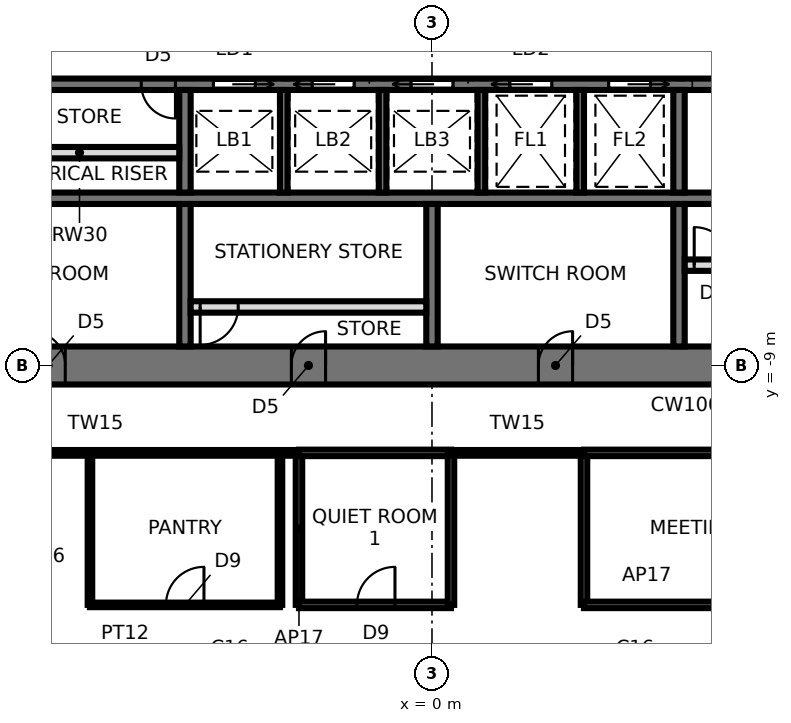
"""IFC4 building model, lengths in metres.
Left out: names, types, materials, properties, quantities, classifications, styles, units other than length and angle.
Written with IfcOpenShell. Run it as: python <this file> out.ifc"""

import sys

from ifc_helpers import new_model, si_unit, direction, frame, frame_2d, origin, place, context, subcontext, project, spatial, rectangle, extrude, element, fill, save


model = new_model("IFC4")
c1 = context("Model", 3, precision=1e-05, world=origin(), true_north=direction((0.0, 1.0)))
c2 = subcontext(c1, "Body", "Model", "MODEL_VIEW")
j1 = project(units=[si_unit("LENGTHUNIT", "METRE"), si_unit("PLANEANGLEUNIT", "RADIAN")], contexts=[c1])
p1 = place(None, origin())
s1 = spatial("IfcSite", under=j1, at=p1, CompositionType="ELEMENT")
p2 = place(p1, origin())
s2 = spatial("IfcBuilding", under=s1, at=p2, CompositionType="ELEMENT")
p3 = place(p2, frame((0.0, 0.0, 127.5)))
s3 = spatial("IfcBuildingStorey", under=s2, at=p3, CompositionType="ELEMENT", Elevation=127.5)
p4 = place(p3, frame((-13.2, -9.0, 0.0), z_axis=(0.0, 0.0, 1.0), x_axis=(1.0, 0.0, 0.0)))
e1 = element("IfcWall", 1, at=p4, inside=s3, PredefinedType="SHEAR", context=c2, shape_type="SweptSolid", body=[
    extrude(rectangle(XDim=26.4, YDim=1.0, at=frame_2d((13.2, 0.0))), origin(), (0.0, 0.0, 1.0), 3.9),
])
p5 = place(p4, frame((2.65, 0.0, 0.0)))
e2 = element("IfcOpeningElement", 2, at=p5, cuts=e1, PredefinedType="OPENING", context=c2, shape_type="SweptSolid", body=[
    extrude(rectangle(XDim=0.9, YDim=2.1, at=frame_2d((0.45, 1.05))), frame((0.0, 0.51, 0.0), z_axis=(0.0, -1.0, 0.0), x_axis=(1.0, 0.0, 0.0)), (0.0, 0.0, 1.0), 1.02),
])
p6 = place(p4, frame((9.5, 0.0, 0.0)))
e3 = element("IfcOpeningElement", 3, at=p6, cuts=e1, PredefinedType="OPENING", context=c2, shape_type="SweptSolid", body=[
    extrude(rectangle(XDim=0.9, YDim=2.1, at=frame_2d((0.45, 1.05))), frame((0.0, 0.51, 0.0), z_axis=(0.0, -1.0, 0.0), x_axis=(1.0, 0.0, 0.0)), (0.0, 0.0, 1.0), 1.02),
])
p7 = place(p4, frame((16.0, 0.0, 0.0)))
e4 = element("IfcOpeningElement", 4, at=p7, cuts=e1, PredefinedType="OPENING", context=c2, shape_type="SweptSolid", body=[
    extrude(rectangle(XDim=0.9, YDim=2.1, at=frame_2d((0.45, 1.05))), frame((0.0, 0.51, 0.0), z_axis=(0.0, -1.0, 0.0), x_axis=(1.0, 0.0, 0.0)), (0.0, 0.0, 1.0), 1.02),
])
p8 = place(p4, frame((22.85, 0.0, 0.0)))
e5 = element("IfcOpeningElement", 5, at=p8, cuts=e1, PredefinedType="OPENING", context=c2, shape_type="SweptSolid", body=[
    extrude(rectangle(XDim=0.9, YDim=2.1, at=frame_2d((0.45, 1.05))), frame((0.0, 0.51, 0.0), z_axis=(0.0, -1.0, 0.0), x_axis=(1.0, 0.0, 0.0)), (0.0, 0.0, 1.0), 1.02),
])
p9 = place(p3, frame((-13.2, -1.6, 0.0), z_axis=(0.0, 0.0, 1.0), x_axis=(1.0, 0.0, 0.0)))
e6 = element("IfcWall", 6, at=p9, inside=s3, PredefinedType="SHEAR", context=c2, shape_type="SweptSolid", body=[
    extrude(rectangle(XDim=26.4, YDim=0.3, at=frame_2d((13.2, 0.0))), origin(), (0.0, 0.0, 1.0), 3.9),
])
p10 = place(p9, frame((25.15, 0.0, 0.0)))
e7 = element("IfcOpeningElement", 7, at=p10, cuts=e6, PredefinedType="OPENING", context=c2, shape_type="SweptSolid", body=[
    extrude(rectangle(XDim=1.0, YDim=2.1, at=frame_2d((0.5, 1.05))), frame((0.0, 0.16, 0.0), z_axis=(0.0, -1.0, 0.0), x_axis=(1.0, 0.0, 0.0)), (0.0, 0.0, 1.0), 0.32),
])
p11 = place(p9, frame((7.45, 0.0, 0.0)))
e8 = element("IfcOpeningElement", 8, at=p11, cuts=e6, PredefinedType="OPENING", context=c2, shape_type="SweptSolid", body=[
    extrude(rectangle(XDim=1.1, YDim=2.3, at=frame_2d((0.55, 1.15))), frame((0.0, 0.16, 0.0), z_axis=(0.0, -1.0, 0.0), x_axis=(1.0, 0.0, 0.0)), (0.0, 0.0, 1.0), 0.32),
])
p12 = place(p9, frame((10.05, 0.0, 0.0)))
e9 = element("IfcOpeningElement", 9, at=p12, cuts=e6, PredefinedType="OPENING", context=c2, shape_type="SweptSolid", body=[
    extrude(rectangle(XDim=1.1, YDim=2.3, at=frame_2d((0.55, 1.15))), frame((0.0, 0.16, 0.0), z_axis=(0.0, -1.0, 0.0), x_axis=(1.0, 0.0, 0.0)), (0.0, 0.0, 1.0), 0.32),
])
p13 = place(p9, frame((12.65, 0.0, 0.0)))
e10 = element("IfcOpeningElement", 10, at=p13, cuts=e6, PredefinedType="OPENING", context=c2, shape_type="SweptSolid", body=[
    extrude(rectangle(XDim=1.1, YDim=2.3, at=frame_2d((0.55, 1.15))), frame((0.0, 0.16, 0.0), z_axis=(0.0, -1.0, 0.0), x_axis=(1.0, 0.0, 0.0)), (0.0, 0.0, 1.0), 0.32),
])
p14 = place(p9, frame((15.25, 0.0, 0.0)))
e11 = element("IfcOpeningElement", 11, at=p14, cuts=e6, PredefinedType="OPENING", context=c2, shape_type="SweptSolid", body=[
    extrude(rectangle(XDim=1.1, YDim=2.3, at=frame_2d((0.55, 1.15))), frame((0.0, 0.16, 0.0), z_axis=(0.0, -1.0, 0.0), x_axis=(1.0, 0.0, 0.0)), (0.0, 0.0, 1.0), 0.32),
])
p15 = place(p9, frame((17.85, 0.0, 0.0)))
e12 = element("IfcOpeningElement", 12, at=p15, cuts=e6, PredefinedType="OPENING", context=c2, shape_type="SweptSolid", body=[
    extrude(rectangle(XDim=1.1, YDim=2.3, at=frame_2d((0.55, 1.15))), frame((0.0, 0.16, 0.0), z_axis=(0.0, -1.0, 0.0), x_axis=(1.0, 0.0, 0.0)), (0.0, 0.0, 1.0), 0.32),
])
p16 = place(p9, frame((5.55, 0.0, 0.0)))
e13 = element("IfcOpeningElement", 13, at=p16, cuts=e6, PredefinedType="OPENING", context=c2, shape_type="SweptSolid", body=[
    extrude(rectangle(XDim=0.9, YDim=2.1, at=frame_2d((0.45, 1.05))), frame((0.0, 0.16, 0.0), z_axis=(0.0, -1.0, 0.0), x_axis=(1.0, 0.0, 0.0)), (0.0, 0.0, 1.0), 0.32),
])
p17 = place(p3, frame((-13.2, -4.6, 0.0), z_axis=(0.0, 0.0, 1.0), x_axis=(1.0, 0.0, 0.0)))
e14 = element("IfcWall", 14, at=p17, inside=s3, PredefinedType="SHEAR", context=c2, shape_type="SweptSolid", body=[
    extrude(rectangle(XDim=26.4, YDim=0.3, at=frame_2d((13.2, 0.0))), origin(), (0.0, 0.0, 1.0), 3.9),
])
p18 = place(p3, frame((-6.5, -1.75, 0.0), z_axis=(0.0, 0.0, 1.0), x_axis=(0.0, -1.0, 0.0)))
e15 = element("IfcWall", 15, at=p18, inside=s3, PredefinedType="SHEAR", context=c2, shape_type="SweptSolid", body=[
    extrude(rectangle(XDim=2.7, YDim=0.3, at=frame_2d((1.35, 0.0))), origin(), (0.0, 0.0, 1.0), 3.9),
])
p19 = place(p3, frame((-6.5, -4.75, 0.0), z_axis=(0.0, 0.0, 1.0), x_axis=(0.0, -1.0, 0.0)))
e16 = element("IfcWall", 16, at=p19, inside=s3, PredefinedType="SHEAR", context=c2, shape_type="SweptSolid", body=[
    extrude(rectangle(XDim=3.75, YDim=0.3, at=frame_2d((1.875, 0.0))), origin(), (0.0, 0.0, 1.0), 3.9),
])
p20 = place(p3, frame((6.5, -1.75, 0.0), z_axis=(0.0, 0.0, 1.0), x_axis=(0.0, -1.0, 0.0)))
e17 = element("IfcWall", 17, at=p20, inside=s3, PredefinedType="SHEAR", context=c2, shape_type="SweptSolid", body=[
    extrude(rectangle(XDim=2.7, YDim=0.3, at=frame_2d((1.35, 0.0))), origin(), (0.0, 0.0, 1.0), 3.9),
])
p21 = place(p3, frame((6.5, -4.75, 0.0), z_axis=(0.0, 0.0, 1.0), x_axis=(0.0, -1.0, 0.0)))
e18 = element("IfcWall", 18, at=p21, inside=s3, PredefinedType="SHEAR", context=c2, shape_type="SweptSolid", body=[
    extrude(rectangle(XDim=3.75, YDim=0.3, at=frame_2d((1.875, 0.0))), origin(), (0.0, 0.0, 1.0), 3.9),
])
for number, where, z_axis, x_axis in (
    (19, (-3.9, -1.75, 0.0), (0.0, 0.0, 1.0), (0.0, -1.0, 0.0)),
    (20, (-1.3, -1.75, 0.0), (0.0, 0.0, 1.0), (0.0, -1.0, 0.0)),
    (21, (1.3, -1.75, 0.0), (0.0, 0.0, 1.0), (0.0, -1.0, 0.0)),
    (22, (3.9, -1.75, 0.0), (0.0, 0.0, 1.0), (0.0, -1.0, 0.0)),
):
    element("IfcWall", number, at=place(p3, frame(where, z_axis=z_axis, x_axis=x_axis)), inside=s3, PredefinedType="SHEAR", context=c2, shape_type="SweptSolid", body=[
        extrude(rectangle(XDim=2.7, YDim=0.2, at=frame_2d((1.35, 0.0))), origin(), (0.0, 0.0, 1.0), 3.9),
    ])
p22 = place(p3, frame((0.0, -4.75, 0.0), z_axis=(0.0, 0.0, 1.0), x_axis=(0.0, -1.0, 0.0)))
e23 = element("IfcWall", 23, at=p22, inside=s3, PredefinedType="SHEAR", context=c2, shape_type="SweptSolid", body=[
    extrude(rectangle(XDim=3.75, YDim=0.3, at=frame_2d((1.875, 0.0))), origin(), (0.0, 0.0, 1.0), 3.9),
])
p23 = place(p3, frame((-6.35, -7.46, 0.0), z_axis=(0.0, 0.0, 1.0), x_axis=(1.0, 0.0, 0.0)))
e24 = element("IfcWall", 24, at=p23, inside=s3, PredefinedType="PARTITIONING", context=c2, shape_type="SweptSolid", body=[
    extrude(rectangle(XDim=6.2, YDim=0.3, at=frame_2d((3.1, 0.0))), origin(), (0.0, 0.0, 1.0), 3.74),
])
p24 = place(p23, frame((0.25, 0.0, 0.0)))
e25 = element("IfcOpeningElement", 25, at=p24, cuts=e24, PredefinedType="OPENING", context=c2, shape_type="SweptSolid", body=[
    extrude(rectangle(XDim=1.0, YDim=2.4, at=frame_2d((0.5, 1.2))), frame((0.0, 0.16, 0.0), z_axis=(0.0, -1.0, 0.0), x_axis=(1.0, 0.0, 0.0)), (0.0, 0.0, 1.0), 0.32),
])
p25 = place(p3, frame((6.65, -6.36, 0.0), z_axis=(0.0, 0.0, 1.0), x_axis=(1.0, 0.0, 0.0)))
e26 = element("IfcWall", 26, at=p25, inside=s3, PredefinedType="PARTITIONING", context=c2, shape_type="SweptSolid", body=[
    extrude(rectangle(XDim=6.55, YDim=0.3, at=frame_2d((3.275, 0.0))), origin(), (0.0, 0.0, 1.0), 3.74),
])
p26 = place(p25, frame((0.25, 0.0, 0.0)))
e27 = element("IfcOpeningElement", 27, at=p26, cuts=e26, PredefinedType="OPENING", context=c2, shape_type="SweptSolid", body=[
    extrude(rectangle(XDim=1.0, YDim=2.4, at=frame_2d((0.5, 1.2))), frame((0.0, 0.16, 0.0), z_axis=(0.0, -1.0, 0.0), x_axis=(1.0, 0.0, 0.0)), (0.0, 0.0, 1.0), 0.32),
])
p27 = place(p3, frame((-13.2, -3.4, 0.0), z_axis=(0.0, 0.0, 1.0), x_axis=(1.0, 0.0, 0.0)))
e28 = element("IfcWall", 28, at=p27, inside=s3, PredefinedType="SOLIDWALL", context=c2, shape_type="SweptSolid", body=[
    extrude(rectangle(XDim=6.55, YDim=0.3, at=frame_2d((3.275, 0.0))), origin(), (0.0, 0.0, 1.0), 3.74),
])
p28 = place(p27, frame((0.25, 0.0, 0.0)))
e29 = element("IfcOpeningElement", 29, at=p28, cuts=e28, PredefinedType="OPENING", context=c2, shape_type="SweptSolid", body=[
    extrude(rectangle(XDim=0.9, YDim=2.1, at=frame_2d((0.45, 1.05))), frame((0.0, 0.16, 0.0), z_axis=(0.0, -1.0, 0.0), x_axis=(1.0, 0.0, 0.0)), (0.0, 0.0, 1.0), 0.32),
])
p29 = place(p3, frame((-14.2, -11.3, 0.0), z_axis=(0.0, 0.0, 1.0), x_axis=(1.0, 0.0, 0.0)))
e30 = element("IfcWall", 30, at=p29, inside=s3, PredefinedType="PARTITIONING", context=c2, shape_type="SweptSolid", body=[
    extrude(rectangle(XDim=10.7, YDim=0.15, at=frame_2d((5.35, 0.0))), origin(), (0.0, 0.0, 1.0), 3.74),
])
p30 = place(p3, frame((-9.0, -11.3, 0.0), z_axis=(0.0, 0.0, 1.0), x_axis=(0.0, -1.0, 0.0)))
e31 = element("IfcWall", 31, at=p30, inside=s3, PredefinedType="PARTITIONING", context=c2, shape_type="SweptSolid", body=[
    extrude(rectangle(XDim=4.0, YDim=0.12, at=frame_2d((2.0, 0.0))), origin(), (0.0, 0.0, 1.0), 3.74),
])
p31 = place(p3, frame((-9.0, -15.3, 0.0), z_axis=(0.0, 0.0, 1.0), x_axis=(1.0, 0.0, 0.0)))
e32 = element("IfcWall", 32, at=p31, inside=s3, PredefinedType="PARTITIONING", context=c2, shape_type="SweptSolid", body=[
    extrude(rectangle(XDim=5.0, YDim=0.12, at=frame_2d((2.5, 0.0))), origin(), (0.0, 0.0, 1.0), 3.286),
])
p32 = place(p31, frame((2.0, 0.0, 0.0)))
e33 = element("IfcOpeningElement", 33, at=p32, cuts=e32, PredefinedType="OPENING", context=c2, shape_type="SweptSolid", body=[
    extrude(rectangle(XDim=1.0, YDim=2.4, at=frame_2d((0.5, 1.2))), frame((0.0, 0.07, 0.0), z_axis=(0.0, -1.0, 0.0), x_axis=(1.0, 0.0, 0.0)), (0.0, 0.0, 1.0), 0.14),
])
p33 = place(p3, frame((-4.0, -15.3, 0.0), z_axis=(0.0, 0.0, 1.0), x_axis=(0.0, 1.0, 0.0)))
e34 = element("IfcWall", 34, at=p33, inside=s3, PredefinedType="PARTITIONING", context=c2, shape_type="SweptSolid", body=[
    extrude(rectangle(XDim=4.0, YDim=0.12, at=frame_2d((2.0, 0.0))), origin(), (0.0, 0.0, 1.0), 3.74),
])
for number, where, z_axis, x_axis in (
    (35, (-3.5, -11.3, 0.0), (0.0, 0.0, 1.0), (0.0, -1.0, 0.0)),
    (36, (0.5, -11.3, 0.0), (0.0, 0.0, 1.0), (-1.0, 0.0, 0.0)),
):
    element("IfcWall", number, at=place(p3, frame(where, z_axis=z_axis, x_axis=x_axis)), inside=s3, PredefinedType="PARTITIONING", context=c2, shape_type="SweptSolid", body=[
        extrude(rectangle(XDim=4.0, YDim=0.17, at=frame_2d((2.0, 0.0))), origin(), (0.0, 0.0, 1.0), 3.74),
    ])
p34 = place(p3, frame((-3.5, -15.3, 0.0), z_axis=(0.0, 0.0, 1.0), x_axis=(1.0, 0.0, 0.0)))
e37 = element("IfcWall", 37, at=p34, inside=s3, PredefinedType="PARTITIONING", context=c2, shape_type="SweptSolid", body=[
    extrude(rectangle(XDim=4.0, YDim=0.17, at=frame_2d((2.0, 0.0))), origin(), (0.0, 0.0, 1.0), 3.74),
])
p35 = place(p34, frame((1.526, 0.0, 0.0)))
e38 = element("IfcOpeningElement", 38, at=p35, cuts=e37, PredefinedType="OPENING", context=c2, shape_type="SweptSolid", body=[
    extrude(rectangle(XDim=1.0, YDim=2.4, at=frame_2d((0.5, 1.2))), frame((0.0, 0.095, 0.0), z_axis=(0.0, -1.0, 0.0), x_axis=(1.0, 0.0, 0.0)), (0.0, 0.0, 1.0), 0.19),
])
p36 = place(p3, frame((0.5, -15.3, 0.0), z_axis=(0.0, 0.0, 1.0), x_axis=(0.0, 1.0, 0.0)))
e39 = element("IfcWall", 39, at=p36, inside=s3, PredefinedType="PARTITIONING", context=c2, shape_type="SweptSolid", body=[
    extrude(rectangle(XDim=4.0, YDim=0.17, at=frame_2d((2.0, 0.0))), origin(), (0.0, 0.0, 1.0), 3.74),
])
p37 = place(p3, frame((0.5, -11.3, 0.0), z_axis=(0.0, 0.0, 1.0), x_axis=(1.0, 0.0, 0.0)))
e40 = element("IfcWall", 40, at=p37, inside=s3, PredefinedType="PARTITIONING", context=c2, shape_type="SweptSolid", body=[
    extrude(rectangle(XDim=3.5, YDim=0.15, at=frame_2d((1.75, 0.0))), origin(), (0.0, 0.0, 1.0), 3.74),
])
p38 = place(p3, frame((4.0, -11.3, 0.0), z_axis=(0.0, 0.0, 1.0), x_axis=(0.0, -1.0, 0.0)))
e41 = element("IfcWall", 41, at=p38, inside=s3, PredefinedType="PARTITIONING", context=c2, shape_type="SweptSolid", body=[
    extrude(rectangle(XDim=4.0, YDim=0.17, at=frame_2d((2.0, 0.0))), origin(), (0.0, 0.0, 1.0), 3.74),
])
p39 = place(p3, frame((4.0, -15.3, 0.0), z_axis=(0.0, 0.0, 1.0), x_axis=(1.0, 0.0, 0.0)))
e42 = element("IfcWall", 42, at=p39, inside=s3, PredefinedType="PARTITIONING", context=c2, shape_type="SweptSolid", body=[
    extrude(rectangle(XDim=8.0, YDim=0.17, at=frame_2d((4.0, 0.0))), origin(), (0.0, 0.0, 1.0), 3.286),
])
p40 = place(p39, frame((3.45, 0.0, 0.0)))
e43 = element("IfcOpeningElement", 43, at=p40, cuts=e42, PredefinedType="OPENING", context=c2, shape_type="SweptSolid", body=[
    extrude(rectangle(XDim=1.1, YDim=2.4, at=frame_2d((0.55, 1.2))), frame((0.0, 0.095, 0.0), z_axis=(0.0, -1.0, 0.0), x_axis=(1.0, 0.0, 0.0)), (0.0, 0.0, 1.0), 0.19),
])
p41 = place(p3, frame((12.0, -11.3, 0.0), z_axis=(0.0, 0.0, 1.0), x_axis=(-1.0, 0.0, 0.0)))
e44 = element("IfcWall", 44, at=p41, inside=s3, PredefinedType="PARTITIONING", context=c2, shape_type="SweptSolid", body=[
    extrude(rectangle(XDim=8.0, YDim=0.17, at=frame_2d((4.0, 0.0))), origin(), (0.0, 0.0, 1.0), 3.74),
])
p42 = place(p11, frame((1.1, 0.0, 0.0), z_axis=(0.0, 0.0, 1.0), x_axis=(-1.0, 0.0, 0.0)))
e45 = element("IfcDoor", 45, at=p42, inside=s3, OperationType="SLIDING_TO_LEFT", PredefinedType="DOOR", context=c2, shape_type="SweptSolid", body=[
    extrude(rectangle(XDim=1.1, YDim=2.3, at=frame_2d((0.55, 1.15))), frame((0.0, 0.025, 0.0), z_axis=(0.0, -1.0, 0.0), x_axis=(1.0, 0.0, 0.0)), (0.0, 0.0, 1.0), 0.05),
])
fill(e8, e45)
p43 = place(p12, frame((1.1, 0.0, 0.0), z_axis=(0.0, 0.0, 1.0), x_axis=(-1.0, 0.0, 0.0)))
e46 = element("IfcDoor", 46, at=p43, inside=s3, OperationType="SLIDING_TO_RIGHT", PredefinedType="DOOR", context=c2, shape_type="SweptSolid", body=[
    extrude(rectangle(XDim=1.1, YDim=2.3, at=frame_2d((0.55, 1.15))), frame((0.0, 0.025, 0.0), z_axis=(0.0, -1.0, 0.0), x_axis=(1.0, 0.0, 0.0)), (0.0, 0.0, 1.0), 0.05),
])
fill(e9, e46)
p44 = place(p13, frame((1.1, 0.0, 0.0), z_axis=(0.0, 0.0, 1.0), x_axis=(-1.0, 0.0, 0.0)))
e47 = element("IfcDoor", 47, at=p44, inside=s3, OperationType="SLIDING_TO_RIGHT", PredefinedType="DOOR", context=c2, shape_type="SweptSolid", body=[
    extrude(rectangle(XDim=1.1, YDim=2.3, at=frame_2d((0.55, 1.15))), frame((0.0, 0.025, 0.0), z_axis=(0.0, -1.0, 0.0), x_axis=(1.0, 0.0, 0.0)), (0.0, 0.0, 1.0), 0.05),
])
fill(e10, e47)
p45 = place(p14, frame((1.1, 0.0, 0.0), z_axis=(0.0, 0.0, 1.0), x_axis=(-1.0, 0.0, 0.0)))
e48 = element("IfcDoor", 48, at=p45, inside=s3, OperationType="SLIDING_TO_RIGHT", PredefinedType="DOOR", context=c2, shape_type="SweptSolid", body=[
    extrude(rectangle(XDim=1.1, YDim=2.3, at=frame_2d((0.55, 1.15))), frame((0.0, 0.025, 0.0), z_axis=(0.0, -1.0, 0.0), x_axis=(1.0, 0.0, 0.0)), (0.0, 0.0, 1.0), 0.05),
])
fill(e11, e48)
p46 = place(p15, frame((1.1, 0.0, 0.0), z_axis=(0.0, 0.0, 1.0), x_axis=(-1.0, 0.0, 0.0)))
e49 = element("IfcDoor", 49, at=p46, inside=s3, OperationType="SLIDING_TO_LEFT", PredefinedType="DOOR", context=c2, shape_type="SweptSolid", body=[
    extrude(rectangle(XDim=1.1, YDim=2.3, at=frame_2d((0.55, 1.15))), frame((0.0, 0.025, 0.0), z_axis=(0.0, -1.0, 0.0), x_axis=(1.0, 0.0, 0.0)), (0.0, 0.0, 1.0), 0.05),
])
fill(e12, e49)
p47 = place(p16, frame((0.9, 0.0, 0.0), z_axis=(0.0, 0.0, 1.0), x_axis=(-1.0, 0.0, 0.0)))
e50 = element("IfcDoor", 50, at=p47, inside=s3, OperationType="SINGLE_SWING_LEFT", PredefinedType="DOOR", context=c2, shape_type="SweptSolid", body=[
    extrude(rectangle(XDim=0.9, YDim=2.1, at=frame_2d((0.45, 1.05))), frame((0.0, 0.025, 0.0), z_axis=(0.0, -1.0, 0.0), x_axis=(1.0, 0.0, 0.0)), (0.0, 0.0, 1.0), 0.05),
])
fill(e13, e50)
p48 = place(p5, origin())
e51 = element("IfcDoor", 51, at=p48, inside=s3, OperationType="SINGLE_SWING_LEFT", PredefinedType="DOOR", context=c2, shape_type="SweptSolid", body=[
    extrude(rectangle(XDim=0.82, YDim=2.06, at=frame_2d((0.45, 1.03))), frame((0.0, 0.025, 0.0), z_axis=(0.0, -1.0, 0.0), x_axis=(1.0, 0.0, 0.0)), (0.0, 0.0, 1.0), 0.05),
    extrude(rectangle(XDim=0.04, YDim=2.1, at=frame_2d((0.02, 1.05))), frame((0.0, 0.25, 0.0), z_axis=(0.0, -1.0, 0.0), x_axis=(1.0, 0.0, 0.0)), (0.0, 0.0, 1.0), 0.5),
    extrude(rectangle(XDim=0.04, YDim=2.1, at=frame_2d((0.88, 1.05))), frame((0.0, 0.25, 0.0), z_axis=(0.0, -1.0, 0.0), x_axis=(1.0, 0.0, 0.0)), (0.0, 0.0, 1.0), 0.5),
    extrude(rectangle(XDim=0.82, YDim=0.04, at=frame_2d((0.45, 2.08))), frame((0.0, 0.25, 0.0), z_axis=(0.0, -1.0, 0.0), x_axis=(1.0, 0.0, 0.0)), (0.0, 0.0, 1.0), 0.5),
])
fill(e2, e51)
p49 = place(p6, origin())
e52 = element("IfcDoor", 52, at=p49, inside=s3, OperationType="SINGLE_SWING_RIGHT", PredefinedType="DOOR", context=c2, shape_type="SweptSolid", body=[
    extrude(rectangle(XDim=0.82, YDim=2.06, at=frame_2d((0.45, 1.03))), frame((0.0, 0.025, 0.0), z_axis=(0.0, -1.0, 0.0), x_axis=(1.0, 0.0, 0.0)), (0.0, 0.0, 1.0), 0.05),
    extrude(rectangle(XDim=0.04, YDim=2.1, at=frame_2d((0.02, 1.05))), frame((0.0, 0.25, 0.0), z_axis=(0.0, -1.0, 0.0), x_axis=(1.0, 0.0, 0.0)), (0.0, 0.0, 1.0), 0.5),
    extrude(rectangle(XDim=0.04, YDim=2.1, at=frame_2d((0.88, 1.05))), frame((0.0, 0.25, 0.0), z_axis=(0.0, -1.0, 0.0), x_axis=(1.0, 0.0, 0.0)), (0.0, 0.0, 1.0), 0.5),
    extrude(rectangle(XDim=0.82, YDim=0.04, at=frame_2d((0.45, 2.08))), frame((0.0, 0.25, 0.0), z_axis=(0.0, -1.0, 0.0), x_axis=(1.0, 0.0, 0.0)), (0.0, 0.0, 1.0), 0.5),
])
fill(e3, e52)
p50 = place(p7, origin())
e53 = element("IfcDoor", 53, at=p50, inside=s3, OperationType="SINGLE_SWING_RIGHT", PredefinedType="DOOR", context=c2, shape_type="SweptSolid", body=[
    extrude(rectangle(XDim=0.82, YDim=2.06, at=frame_2d((0.45, 1.03))), frame((0.0, 0.025, 0.0), z_axis=(0.0, -1.0, 0.0), x_axis=(1.0, 0.0, 0.0)), (0.0, 0.0, 1.0), 0.05),
    extrude(rectangle(XDim=0.04, YDim=2.1, at=frame_2d((0.02, 1.05))), frame((0.0, 0.25, 0.0), z_axis=(0.0, -1.0, 0.0), x_axis=(1.0, 0.0, 0.0)), (0.0, 0.0, 1.0), 0.5),
    extrude(rectangle(XDim=0.04, YDim=2.1, at=frame_2d((0.88, 1.05))), frame((0.0, 0.25, 0.0), z_axis=(0.0, -1.0, 0.0), x_axis=(1.0, 0.0, 0.0)), (0.0, 0.0, 1.0), 0.5),
    extrude(rectangle(XDim=0.82, YDim=0.04, at=frame_2d((0.45, 2.08))), frame((0.0, 0.25, 0.0), z_axis=(0.0, -1.0, 0.0), x_axis=(1.0, 0.0, 0.0)), (0.0, 0.0, 1.0), 0.5),
])
fill(e4, e53)
p51 = place(p24, frame((1.0, 0.0, 0.0), z_axis=(0.0, 0.0, 1.0), x_axis=(-1.0, 0.0, 0.0)))
e54 = element("IfcDoor", 54, at=p51, inside=s3, OperationType="SINGLE_SWING_RIGHT", PredefinedType="DOOR", context=c2, shape_type="SweptSolid", body=[
    extrude(rectangle(XDim=1.0, YDim=2.4, at=frame_2d((0.5, 1.2))), frame((0.0, 0.025, 0.0), z_axis=(0.0, -1.0, 0.0), x_axis=(1.0, 0.0, 0.0)), (0.0, 0.0, 1.0), 0.05),
])
fill(e25, e54)
p52 = place(p26, origin())
e55 = element("IfcDoor", 55, at=p52, inside=s3, OperationType="SINGLE_SWING_LEFT", PredefinedType="DOOR", context=c2, shape_type="SweptSolid", body=[
    extrude(rectangle(XDim=1.0, YDim=2.4, at=frame_2d((0.5, 1.2))), frame((0.0, 0.025, 0.0), z_axis=(0.0, -1.0, 0.0), x_axis=(1.0, 0.0, 0.0)), (0.0, 0.0, 1.0), 0.05),
])
fill(e27, e55)
p53 = place(p32, origin())
e56 = element("IfcDoor", 56, at=p53, inside=s3, OperationType="SINGLE_SWING_RIGHT", PredefinedType="DOOR", context=c2, shape_type="SweptSolid", body=[
    extrude(rectangle(XDim=1.0, YDim=2.4, at=frame_2d((0.5, 1.2))), frame((0.0, 0.025, 0.0), z_axis=(0.0, -1.0, 0.0), x_axis=(1.0, 0.0, 0.0)), (0.0, 0.0, 1.0), 0.05),
])
fill(e33, e56)
p54 = place(p35, origin())
e57 = element("IfcDoor", 57, at=p54, inside=s3, OperationType="SINGLE_SWING_RIGHT", PredefinedType="DOOR", context=c2, shape_type="SweptSolid", body=[
    extrude(rectangle(XDim=1.0, YDim=2.4, at=frame_2d((0.5, 1.2))), frame((0.0, 0.025, 0.0), z_axis=(0.0, -1.0, 0.0), x_axis=(1.0, 0.0, 0.0)), (0.0, 0.0, 1.0), 0.05),
])
fill(e38, e57)
save(model, sys.argv[1])
